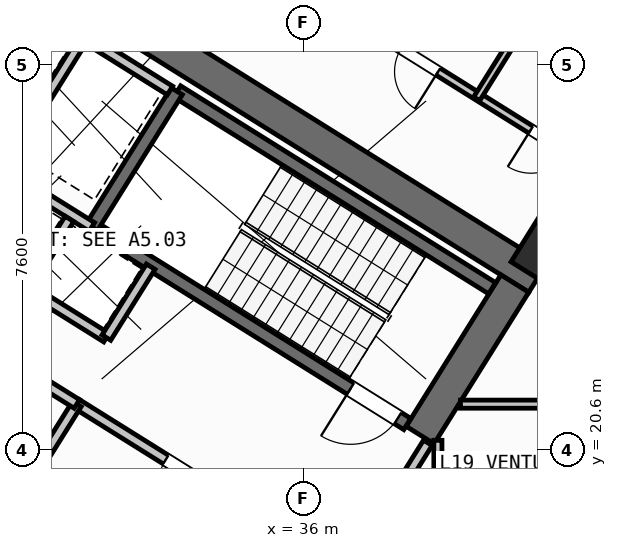
"""IFC4 building model, lengths in metres.
Left out: names, types, materials, properties, quantities, classifications, styles, units other than length and angle.
Written with IfcOpenShell. Run it as: python <this file> out.ifc"""

import sys

from ifc_helpers import new_model, si_unit, direction, frame, frame_2d, origin, origin_2d, place, context, subcontext, project, spatial, rectangle, hollow_rectangle, extrude, source, transform, mapped, element, fill, save


model = new_model("IFC4")
c1 = context("Model", 3, precision=1e-05, world=origin(), true_north=direction((0.0, 1.0)))
c2 = subcontext(c1, "Body", "Model", "MODEL_VIEW")
j1 = project(units=[si_unit("LENGTHUNIT", "METRE"), si_unit("PLANEANGLEUNIT", "RADIAN")], contexts=[c1])
p1 = place(None, origin())
s1 = spatial("IfcSite", under=j1, at=p1, CompositionType="ELEMENT")
p2 = place(p1, origin())
s2 = spatial("IfcBuilding", under=s1, at=p2, CompositionType="ELEMENT")
p3 = place(p2, frame((0.0, 0.0, 76.5)))
s3 = spatial("IfcBuildingStorey", under=s2, at=p3, CompositionType="ELEMENT", Elevation=76.5)
p4 = place(p3, frame((40.615, 23.983, 0.0), z_axis=(0.0, 0.0, 1.0), x_axis=(-0.848045953968, 0.529922692436, 0.0)))
e1 = element("IfcWall", 1, at=p4, inside=s3, PredefinedType="SHEAR", context=c2, shape_type="SweptSolid", body=[
    extrude(rectangle(XDim=13.24, YDim=0.65, at=frame_2d((6.62, 0.0))), origin(), (0.0, 0.0, 1.0), 4.25),
])
p5 = place(p3, frame((40.168, 23.88, 0.0), z_axis=(0.0, 0.0, 1.0), x_axis=(-0.529893103397, -0.8480644427, 0.0)))
e2 = element("IfcWall", 2, at=p5, inside=s3, PredefinedType="SHEAR", context=c2, shape_type="SweptSolid", body=[
    extrude(rectangle(XDim=3.525, YDim=0.65, at=frame_2d((1.763, 0.0))), origin(), (0.0, 0.0, 1.0), 4.25),
])
m1 = source(origin(), c2, "Body", "SweptSolid", [
    extrude(hollow_rectangle(XDim=1.0, YDim=1.0, WallThickness=0.04, at=origin_2d()), origin(), (0.0, 0.0, 1.0), 4.5),
])
p6 = place(p3, frame((40.783, 24.469, 0.0), z_axis=(0.0, 0.0, 1.0), x_axis=(-0.848048096156, 0.529919264233, 0.0)))
e3 = element("IfcColumn", 3, at=p6, inside=s3, PredefinedType="COLUMN", context=c2, shape_type="MappedRepresentation", body=[
    mapped(m1, transform((0.0, 0.0, 0.0), scale=1.0)),
])
p7 = place(p3, frame((31.76, 12.183, 0.0), z_axis=(0.0, 0.0, 1.0), x_axis=(-0.848047074256, 0.529920899612, 0.0)))
e4 = element("IfcWall", 4, at=p7, inside=s3, PredefinedType="STANDARD", context=c2, shape_type="SweptSolid", body=[
    extrude(rectangle(XDim=30.652, YDim=0.32, at=frame_2d((15.326, 0.0))), origin(), (0.0, 0.0, 1.0), 4.25),
])
p8 = place(p7, frame((14.878, 0.0, 0.0)))
e5 = element("IfcOpeningElement", 5, at=p8, cuts=e4, PredefinedType="OPENING", context=c2, shape_type="SweptSolid", body=[
    extrude(rectangle(XDim=1.2, YDim=2.15, at=frame_2d((0.6, 1.075))), frame((0.0, 0.17, 0.0), z_axis=(0.0, -1.0, 0.0), x_axis=(1.0, 0.0, 0.0)), (0.0, 0.0, 1.0), 0.34),
])
p9 = place(p7, frame((1.74, 0.0, 0.7)))
e6 = element("IfcOpeningElement", 6, at=p9, cuts=e4, PredefinedType="OPENING", context=c2, shape_type="SweptSolid", body=[
    extrude(rectangle(XDim=2.6, YDim=2.0, at=frame_2d((1.3, 1.0))), frame((0.0, 0.17, 0.0), z_axis=(0.0, -1.0, 0.0), x_axis=(1.0, 0.0, 0.0)), (0.0, 0.0, 1.0), 0.34),
])
p10 = place(p7, frame((6.919, 0.0, 0.7)))
e7 = element("IfcOpeningElement", 7, at=p10, cuts=e4, PredefinedType="OPENING", context=c2, shape_type="SweptSolid", body=[
    extrude(rectangle(XDim=2.6, YDim=2.0, at=frame_2d((1.3, 1.0))), frame((0.0, 0.17, 0.0), z_axis=(0.0, -1.0, 0.0), x_axis=(1.0, 0.0, 0.0)), (0.0, 0.0, 1.0), 0.34),
])
p11 = place(p7, frame((19.451, 0.0, 0.85)))
e8 = element("IfcOpeningElement", 8, at=p11, cuts=e4, PredefinedType="OPENING", context=c2, shape_type="SweptSolid", body=[
    extrude(rectangle(XDim=1.6, YDim=1.8, at=frame_2d((0.8, 0.9))), frame((0.0, 0.17, 0.0), z_axis=(0.0, -1.0, 0.0), x_axis=(1.0, 0.0, 0.0)), (0.0, 0.0, 1.0), 0.34),
])
p12 = place(p7, frame((26.358, 0.0, 0.7)))
e9 = element("IfcOpeningElement", 9, at=p12, cuts=e4, PredefinedType="OPENING", context=c2, shape_type="SweptSolid", body=[
    extrude(rectangle(XDim=2.6, YDim=2.0, at=frame_2d((1.3, 1.0))), frame((0.0, 0.17, 0.0), z_axis=(0.0, -1.0, 0.0), x_axis=(1.0, 0.0, 0.0)), (0.0, 0.0, 1.0), 0.34),
])
p13 = place(p3, frame((31.28, 18.261, 0.0), z_axis=(0.0, 0.0, 1.0), x_axis=(-0.848051618787, 0.529913626805, 0.0)))
e10 = element("IfcWall", 10, at=p13, inside=s3, PredefinedType="SHEAR", context=c2, shape_type="SweptSolid", body=[
    extrude(rectangle(XDim=7.46, YDim=0.26, at=frame_2d((3.73, 0.0))), origin(), (0.0, 0.0, 1.0), 4.25),
])
p14 = place(p13, frame((0.36, 0.0, 0.0)))
e11 = element("IfcOpeningElement", 11, at=p14, cuts=e10, PredefinedType="OPENING", context=c2, shape_type="SweptSolid", body=[
    extrude(rectangle(XDim=0.86, YDim=2.05, at=frame_2d((0.43, 1.025))), frame((0.0, 0.14, 0.0), z_axis=(0.0, -1.0, 0.0), x_axis=(1.0, 0.0, 0.0)), (0.0, 0.0, 1.0), 0.28),
])
p15 = place(p3, frame((39.721, 23.788, 0.0), z_axis=(0.0, 0.0, 1.0), x_axis=(-0.848054434086, 0.529909121291, 0.0)))
e12 = element("IfcWall", 12, at=p15, inside=s3, PredefinedType="SHEAR", context=c2, shape_type="SweptSolid", body=[
    extrude(rectangle(XDim=7.33, YDim=0.26, at=frame_2d((3.665, 0.0))), origin(), (0.0, 0.0, 1.0), 4.25),
])
p16 = place(p3, frame((38.046, 21.108, 0.0), z_axis=(0.0, 0.0, 1.0), x_axis=(-0.848054434086, 0.529909121291, 0.0)))
e13 = element("IfcWall", 13, at=p16, inside=s3, PredefinedType="SHEAR", context=c2, shape_type="SweptSolid", body=[
    extrude(rectangle(XDim=7.33, YDim=0.26, at=frame_2d((3.665, 0.0))), origin(), (0.0, 0.0, 1.0), 4.25),
])
p17 = place(p16, frame((0.22, 0.0, 0.0)))
e14 = element("IfcOpeningElement", 14, at=p17, cuts=e13, PredefinedType="OPENING", context=c2, shape_type="SweptSolid", body=[
    extrude(rectangle(XDim=1.1, YDim=2.1, at=frame_2d((0.55, 1.05))), frame((0.0, 0.14, 0.0), z_axis=(0.0, -1.0, 0.0), x_axis=(1.0, 0.0, 0.0)), (0.0, 0.0, 1.0), 0.28),
])
p18 = place(p3, frame((33.496, 27.677, 0.0), z_axis=(0.0, 0.0, 1.0), x_axis=(-0.529908658664, -0.84805472316, 0.0)))
e15 = element("IfcWall", 15, at=p18, inside=s3, PredefinedType="SHEAR", context=c2, shape_type="SweptSolid", body=[
    extrude(rectangle(XDim=3.16, YDim=0.26, at=frame_2d((1.58, 0.0))), origin(), (0.0, 0.0, 1.0), 4.25),
])
p19 = place(p3, frame((36.374, 18.474, 0.0), z_axis=(0.0, 0.0, 1.0), x_axis=(-0.848051071577, 0.529914502535, 0.0)))
e16 = element("IfcWall", 16, at=p19, inside=s3, PredefinedType="STANDARD", context=c2, shape_type="SweptSolid", body=[
    extrude(rectangle(XDim=5.718, YDim=0.2, at=frame_2d((2.859, 0.0))), origin(), (0.0, 0.0, 1.0), 4.24),
])
p20 = place(p19, frame((2.498, 0.0, 0.0)))
e17 = element("IfcOpeningElement", 17, at=p20, cuts=e16, PredefinedType="OPENING", context=c2, shape_type="SweptSolid", body=[
    extrude(rectangle(XDim=1.15, YDim=2.1, at=frame_2d((0.575, 1.05))), frame((0.0, 0.11, 0.0), z_axis=(0.0, -1.0, 0.0), x_axis=(1.0, 0.0, 0.0)), (0.0, 0.0, 1.0), 0.22),
])
p21 = place(p3, frame((31.822, 24.998, 0.0), z_axis=(0.0, 0.0, 1.0), x_axis=(-0.848058348634, 0.529902856485, 0.0)))
e18 = element("IfcWall", 18, at=p21, inside=s3, PredefinedType="STANDARD", context=c2, shape_type="SweptSolid", body=[
    extrude(rectangle(XDim=4.568, YDim=0.2, at=frame_2d((2.284, 0.0))), origin(), (0.0, 0.0, 1.0), 4.24),
])
p22 = place(p3, frame((32.108, 22.814, 0.0), z_axis=(0.0, 0.0, 1.0), x_axis=(-0.848042229521, 0.529928652696, 0.0)))
e19 = element("IfcWall", 19, at=p22, inside=s3, PredefinedType="STANDARD", context=c2, shape_type="SweptSolid", body=[
    extrude(rectangle(XDim=5.62, YDim=0.2, at=frame_2d((2.81, 0.0))), origin(), (0.0, 0.0, 1.0), 4.24),
])
p23 = place(p3, frame((32.982, 24.213, 0.0), z_axis=(0.0, 0.0, 1.0), x_axis=(-0.529839334948, -0.84809803628, 0.0)))
e20 = element("IfcWall", 20, at=p23, inside=s3, PredefinedType="STANDARD", context=c2, shape_type="SweptSolid", body=[
    extrude(rectangle(XDim=1.65, YDim=0.2, at=frame_2d((0.825, 0.0))), origin(), (0.0, 0.0, 1.0), 4.24),
])
p24 = place(p3, frame((31.645, 28.716, 0.0), z_axis=(0.0, 0.0, 1.0), x_axis=(-0.52986693015, -0.848080795876, 0.0)))
e21 = element("IfcWall", 21, at=p24, inside=s3, PredefinedType="STANDARD", context=c2, shape_type="SweptSolid", body=[
    extrude(rectangle(XDim=2.66, YDim=0.2, at=frame_2d((1.33, 0.0))), origin(), (0.0, 0.0, 1.0), 4.24),
])
p25 = place(p3, frame((33.363, 27.69, 0.0), z_axis=(0.0, 0.0, 1.0), x_axis=(-0.848053806312, 0.529910125964, 0.0)))
e22 = element("IfcWall", 22, at=p25, inside=s3, PredefinedType="STANDARD", context=c2, shape_type="SweptSolid", body=[
    extrude(rectangle(XDim=4.448, YDim=0.2, at=frame_2d((2.224, 0.0))), origin(), (0.0, 0.0, 1.0), 4.24),
])
p26 = place(p3, frame((31.379, 25.156, 0.0), z_axis=(0.0, 0.0, 1.0), x_axis=(-0.529998940003, -0.847998304005, 0.0)))
e23 = element("IfcWall", 23, at=p26, inside=s3, PredefinedType="STANDARD", context=c2, shape_type="SweptSolid", body=[
    extrude(rectangle(XDim=1.58, YDim=0.2, at=frame_2d((0.79, 0.0))), origin(), (0.0, 0.0, 1.0), 4.24),
])
p27 = place(p3, frame((31.525, 21.504, 0.0), z_axis=(0.0, 0.0, 1.0), x_axis=(-0.529907497854, -0.848055448493, 0.0)))
e24 = element("IfcWall", 24, at=p27, inside=s3, PredefinedType="STANDARD", context=c2, shape_type="SweptSolid", body=[
    extrude(rectangle(XDim=2.88, YDim=0.2, at=frame_2d((1.44, 0.0))), origin(), (0.0, 0.0, 1.0), 4.24),
])
p28 = place(p3, frame((31.525, 21.504, 0.0), z_axis=(0.0, 0.0, 1.0), x_axis=(-0.848044998614, 0.529924221305, 0.0)))
e25 = element("IfcWall", 25, at=p28, inside=s3, PredefinedType="STANDARD", context=c2, shape_type="SweptSolid", body=[
    extrude(rectangle(XDim=6.168, YDim=0.2, at=frame_2d((3.084, 0.0))), origin(), (0.0, 0.0, 1.0), 4.24),
])
p29 = place(p28, frame((4.4, 0.0, 0.0)))
e26 = element("IfcOpeningElement", 26, at=p29, cuts=e25, PredefinedType="OPENING", context=c2, shape_type="SweptSolid", body=[
    extrude(rectangle(XDim=0.86, YDim=2.05, at=frame_2d((0.43, 1.025))), frame((0.0, 0.11, 0.0), z_axis=(0.0, -1.0, 0.0), x_axis=(1.0, 0.0, 0.0)), (0.0, 0.0, 1.0), 0.22),
])
p30 = place(p28, frame((1.45, 0.0, 0.0)))
e27 = element("IfcOpeningElement", 27, at=p30, cuts=e25, PredefinedType="OPENING", context=c2, shape_type="SweptSolid", body=[
    extrude(rectangle(XDim=0.86, YDim=2.05, at=frame_2d((0.43, 1.025))), frame((0.0, 0.11, 0.0), z_axis=(0.0, -1.0, 0.0), x_axis=(1.0, 0.0, 0.0)), (0.0, 0.0, 1.0), 0.22),
])
p31 = place(p3, frame((31.239, 38.274, 0.0), z_axis=(0.0, 0.0, 1.0), x_axis=(-0.529921796515, -0.848046513806, 0.0)))
e28 = element("IfcWall", 28, at=p31, inside=s3, PredefinedType="PARTITIONING", context=c2, shape_type="SweptSolid", body=[
    extrude(rectangle(XDim=16.5, YDim=0.16, at=frame_2d((8.25, 0.0))), origin(), (0.0, 0.0, 1.0), 4.24),
])
p32 = place(p3, frame((41.936, 26.012, 0.0), z_axis=(0.0, 0.0, 1.0), x_axis=(-0.848051154596, 0.529914369676, 0.0)))
e29 = element("IfcWall", 29, at=p32, inside=s3, PredefinedType="PARTITIONING", context=c2, shape_type="SweptSolid", body=[
    extrude(rectangle(XDim=15.57, YDim=0.16, at=frame_2d((7.785, 0.0))), origin(), (0.0, 0.0, 1.0), 4.24),
])
p33 = place(p32, frame((0.85, 0.0, 0.0)))
e30 = element("IfcOpeningElement", 30, at=p33, cuts=e29, PredefinedType="OPENING", context=c2, shape_type="SweptSolid", body=[
    extrude(rectangle(XDim=0.86, YDim=2.05, at=frame_2d((0.43, 1.025))), frame((0.0, 0.09, 0.0), z_axis=(0.0, -1.0, 0.0), x_axis=(1.0, 0.0, 0.0)), (0.0, 0.0, 1.0), 0.18),
])
p34 = place(p32, frame((3.87, 0.0, 0.0)))
e31 = element("IfcOpeningElement", 31, at=p34, cuts=e29, PredefinedType="OPENING", context=c2, shape_type="SweptSolid", body=[
    extrude(rectangle(XDim=0.86, YDim=2.05, at=frame_2d((0.43, 1.025))), frame((0.0, 0.09, 0.0), z_axis=(0.0, -1.0, 0.0), x_axis=(1.0, 0.0, 0.0)), (0.0, 0.0, 1.0), 0.18),
])
p35 = place(p32, frame((6.33, 0.0, 0.0)))
e32 = element("IfcOpeningElement", 32, at=p35, cuts=e29, PredefinedType="OPENING", context=c2, shape_type="SweptSolid", body=[
    extrude(rectangle(XDim=0.78, YDim=2.05, at=frame_2d((0.39, 1.025))), frame((0.0, 0.09, 0.0), z_axis=(0.0, -1.0, 0.0), x_axis=(1.0, 0.0, 0.0)), (0.0, 0.0, 1.0), 0.18),
])
p36 = place(p32, frame((8.78, 0.0, 0.0)))
e33 = element("IfcOpeningElement", 33, at=p36, cuts=e29, PredefinedType="OPENING", context=c2, shape_type="SweptSolid", body=[
    extrude(rectangle(XDim=0.78, YDim=2.05, at=frame_2d((0.39, 1.025))), frame((0.0, 0.09, 0.0), z_axis=(0.0, -1.0, 0.0), x_axis=(1.0, 0.0, 0.0)), (0.0, 0.0, 1.0), 0.18),
])
p37 = place(p32, frame((11.18, 0.0, 0.0)))
e34 = element("IfcOpeningElement", 34, at=p37, cuts=e29, PredefinedType="OPENING", context=c2, shape_type="SweptSolid", body=[
    extrude(rectangle(XDim=0.78, YDim=2.05, at=frame_2d((0.39, 1.025))), frame((0.0, 0.09, 0.0), z_axis=(0.0, -1.0, 0.0), x_axis=(1.0, 0.0, 0.0)), (0.0, 0.0, 1.0), 0.18),
])
p38 = place(p3, frame((40.512, 29.281, 0.0), z_axis=(0.0, 0.0, 1.0), x_axis=(-0.529935255849, -0.848038103276, 0.0)))
e35 = element("IfcWall", 35, at=p38, inside=s3, PredefinedType="PLUMBINGWALL", context=c2, shape_type="SweptSolid", body=[
    extrude(rectangle(XDim=2.068, YDim=0.14, at=frame_2d((1.034, 0.0))), origin(), (0.0, 0.0, 1.0), 4.24),
])
p39 = place(p3, frame((38.451, 20.737, 0.0), z_axis=(0.0, 0.0, 1.0), x_axis=(-0.529924799939, -0.848044637038, 0.0)))
e36 = element("IfcWall", 36, at=p39, inside=s3, PredefinedType="STANDARD", context=c2, shape_type="SweptSolid", body=[
    extrude(rectangle(XDim=2.96, YDim=0.2, at=frame_2d((1.48, 0.0))), origin(), (0.0, 0.0, 1.0), 4.24),
])
p40 = place(p39, frame((1.46, 0.0, 0.0)))
e37 = element("IfcOpeningElement", 37, at=p40, cuts=e36, PredefinedType="OPENING", context=c2, shape_type="SweptSolid", body=[
    extrude(rectangle(XDim=0.86, YDim=2.05, at=frame_2d((0.43, 1.025))), frame((0.0, 0.11, 0.0), z_axis=(0.0, -1.0, 0.0), x_axis=(1.0, 0.0, 0.0)), (0.0, 0.0, 1.0), 0.22),
])
p41 = place(p3, frame((38.65, 17.93, 0.0), z_axis=(0.0, 0.0, 1.0), x_axis=(0.0, 1.0, 0.0)))
e38 = element("IfcWall", 38, at=p41, inside=s3, PredefinedType="PARTITIONING", context=c2, shape_type="SweptSolid", body=[
    extrude(rectangle(XDim=2.857, YDim=0.16, at=frame_2d((1.428, 0.0))), origin(), (0.0, 0.0, 1.0), 4.24),
])
p42 = place(p3, frame((39.095, 21.5, 0.0), z_axis=(0.0, 0.0, 1.0), x_axis=(1.0, 0.0, 0.0)))
e39 = element("IfcWall", 39, at=p42, inside=s3, PredefinedType="PARTITIONING", context=c2, shape_type="SweptSolid", body=[
    extrude(rectangle(XDim=7.094, YDim=0.16, at=frame_2d((3.547, 0.0))), origin(), (0.0, 0.0, 1.0), 4.24),
])
m2 = source(origin(), c2, "Body", "SweptSolid", [
    extrude(rectangle(XDim=1.1, YDim=2.1, at=frame_2d((0.55, 1.05))), frame((0.0, 0.025, 0.0), z_axis=(0.0, -1.0, 0.0), x_axis=(1.0, 0.0, 0.0)), (0.0, 0.0, 1.0), 0.05),
])
p43 = place(p17, origin())
e40 = element("IfcDoor", 40, at=p43, inside=s3, OperationType="SINGLE_SWING_RIGHT", PredefinedType="DOOR", context=c2, shape_type="MappedRepresentation", body=[
    mapped(m2, transform((0.0, 0.0, 0.0), scale=1.0)),
])
fill(e14, e40)
m3 = source(origin(), c2, "Body", "SweptSolid", [
    extrude(rectangle(XDim=1.15, YDim=2.1, at=frame_2d((0.575, 1.05))), frame((0.0, 0.025, 0.0), z_axis=(0.0, -1.0, 0.0), x_axis=(1.0, 0.0, 0.0)), (0.0, 0.0, 1.0), 0.05),
])
p44 = place(p20, origin())
e41 = element("IfcDoor", 41, at=p44, inside=s3, OperationType="SINGLE_SWING_LEFT", PredefinedType="DOOR", context=c2, shape_type="MappedRepresentation", body=[
    mapped(m3, transform((0.0, 0.0, 0.0), scale=1.0)),
])
fill(e17, e41)
m4 = source(origin(), c2, "Body", "SweptSolid", [
    extrude(rectangle(XDim=0.86, YDim=2.05, at=frame_2d((0.43, 1.025))), frame((0.0, 0.025, 0.0), z_axis=(0.0, -1.0, 0.0), x_axis=(1.0, 0.0, 0.0)), (0.0, 0.0, 1.0), 0.05),
])
p45 = place(p33, origin())
e42 = element("IfcDoor", 42, at=p45, inside=s3, OperationType="SINGLE_SWING_RIGHT", PredefinedType="DOOR", context=c2, shape_type="MappedRepresentation", body=[
    mapped(m4, transform((0.0, 0.0, 0.0), scale=1.0)),
])
fill(e30, e42)
p46 = place(p34, origin())
e43 = element("IfcDoor", 43, at=p46, inside=s3, OperationType="SINGLE_SWING_LEFT", PredefinedType="DOOR", context=c2, shape_type="MappedRepresentation", body=[
    mapped(m4, transform((0.0, 0.0, 0.0), scale=1.0)),
])
fill(e31, e43)
save(model, sys.argv[1])
